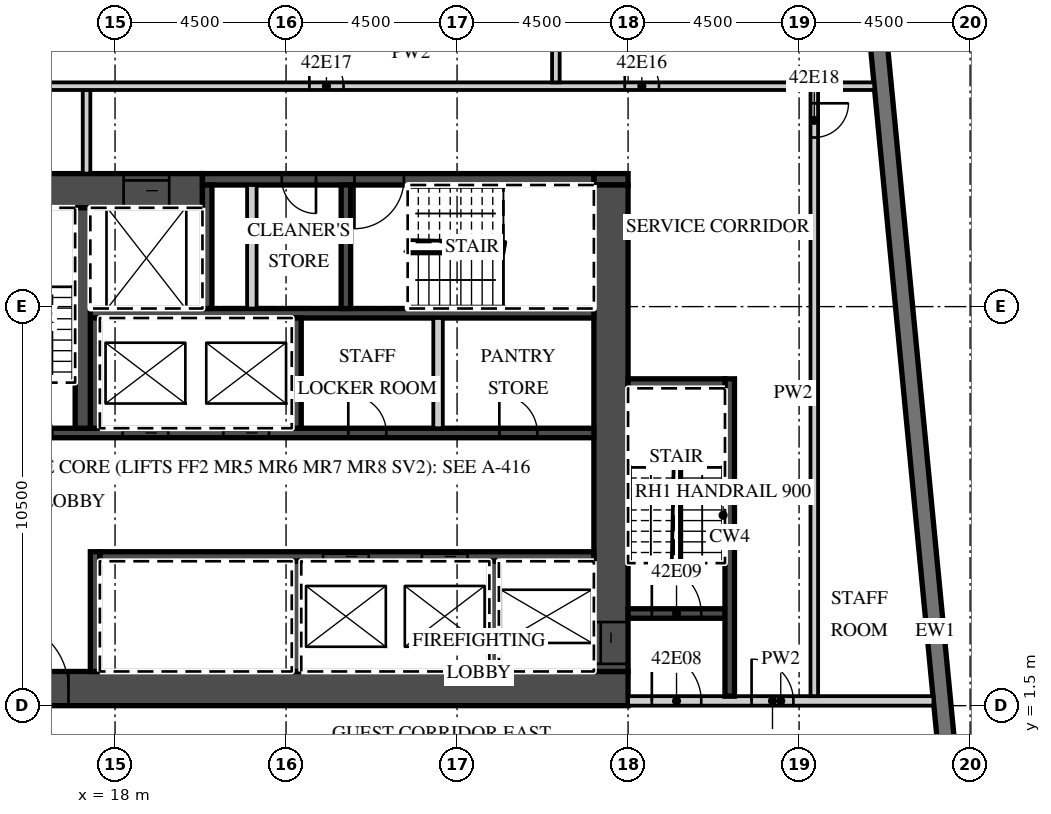
"""IFC4 building model, lengths in metres.
Left out: names, types, materials, properties, quantities, classifications, styles, units other than length and angle.
Written with IfcOpenShell. Run it as: python <this file> out.ifc"""

import sys

from ifc_helpers import new_model, si_unit, direction, frame, frame_2d, origin, place, context, subcontext, project, spatial, rectangle, extrude, element, fill, save


model = new_model("IFC4")
c1 = context("Model", 3, precision=1e-05, world=origin(), true_north=direction((0.0, 1.0)))
c2 = subcontext(c1, "Body", "Model", "MODEL_VIEW")
j1 = project(units=[si_unit("LENGTHUNIT", "METRE"), si_unit("PLANEANGLEUNIT", "RADIAN")], contexts=[c1])
p1 = place(None, origin())
s1 = spatial("IfcSite", under=j1, at=p1, CompositionType="ELEMENT")
p2 = place(p1, origin())
s2 = spatial("IfcBuilding", under=s1, at=p2, CompositionType="ELEMENT")
p3 = place(p2, frame((0.0, 0.0, 180.1)))
s3 = spatial("IfcBuildingStorey", under=s2, at=p3, CompositionType="ELEMENT", Elevation=180.1)
p4 = place(p3, frame((41.214, -13.466, 0.0), z_axis=(0.0, 0.0, 1.0), x_axis=(-0.095847314626, 0.995396047952, 0.0)))
e1 = element("IfcWall", 1, at=p4, inside=s3, PredefinedType="SOLIDWALL", context=c2, shape_type="SweptSolid", body=[
    extrude(rectangle(XDim=34.0, YDim=0.45, at=frame_2d((17.0, 0.0))), origin(), (0.0, 0.0, 1.0), 3.02),
])
p5 = place(p4, frame((3.869, 0.0, 0.45)))
e2 = element("IfcOpeningElement", 2, at=p5, cuts=e1, PredefinedType="OPENING", context=c2, shape_type="SweptSolid", body=[
    extrude(rectangle(XDim=3.3, YDim=2.25, at=frame_2d((1.65, 1.125))), frame((0.0, 0.235, 0.0), z_axis=(0.0, -1.0, 0.0), x_axis=(1.0, 0.0, 0.0)), (0.0, 0.0, 1.0), 0.47),
])
p6 = place(p4, frame((8.39, 0.0, 0.45)))
e3 = element("IfcOpeningElement", 3, at=p6, cuts=e1, PredefinedType="OPENING", context=c2, shape_type="SweptSolid", body=[
    extrude(rectangle(XDim=3.3, YDim=2.25, at=frame_2d((1.65, 1.125))), frame((0.0, 0.235, 0.0), z_axis=(0.0, -1.0, 0.0), x_axis=(1.0, 0.0, 0.0)), (0.0, 0.0, 1.0), 0.47),
])
p7 = place(p3, frame((13.5, 1.95, 0.0), z_axis=(0.0, 0.0, 1.0), x_axis=(1.0, 0.0, 0.0)))
e4 = element("IfcWall", 4, at=p7, inside=s3, PredefinedType="SHEAR", context=c2, shape_type="SweptSolid", body=[
    extrude(rectangle(XDim=18.0, YDim=0.9, at=frame_2d((9.0, 0.0))), origin(), (0.0, 0.0, 1.0), 3.02),
])
p8 = place(p7, frame((1.475, 0.0, 0.0)))
e5 = element("IfcOpeningElement", 5, at=p8, cuts=e4, PredefinedType="OPENING", context=c2, shape_type="SweptSolid", body=[
    extrude(rectangle(XDim=1.8, YDim=2.1, at=frame_2d((0.9, 1.05))), frame((0.0, 0.46, 0.0), z_axis=(0.0, -1.0, 0.0), x_axis=(1.0, 0.0, 0.0)), (0.0, 0.0, 1.0), 0.92),
])
p9 = place(p3, frame((13.5, 15.05, 0.0), z_axis=(0.0, 0.0, 1.0), x_axis=(1.0, 0.0, 0.0)))
e6 = element("IfcWall", 6, at=p9, inside=s3, PredefinedType="SHEAR", context=c2, shape_type="SweptSolid", body=[
    extrude(rectangle(XDim=6.8, YDim=0.9, at=frame_2d((3.4, 0.0))), origin(), (0.0, 0.0, 1.0), 3.02),
])
p10 = place(p9, frame((4.725, 0.0, 0.0)))
e7 = element("IfcOpeningElement", 7, at=p10, cuts=e6, PredefinedType="OPENING", context=c2, shape_type="SweptSolid", body=[
    extrude(rectangle(XDim=1.2, YDim=2.1, at=frame_2d((0.6, 1.05))), frame((0.0, 0.46, 0.0), z_axis=(0.0, -1.0, 0.0), x_axis=(1.0, 0.0, 0.0)), (0.0, 0.0, 1.0), 0.92),
])
p11 = place(p3, frame((30.6, 15.35, 0.0), z_axis=(0.0, 0.0, 1.0), x_axis=(1.0, 0.0, 0.0)))
e8 = element("IfcWall", 8, at=p11, inside=s3, PredefinedType="SHEAR", context=c2, shape_type="SweptSolid", body=[
    extrude(rectangle(XDim=0.9, YDim=0.3, at=frame_2d((0.45, 0.0))), origin(), (0.0, 0.0, 1.0), 3.02),
])
p12 = place(p3, frame((20.3, 15.35, 0.0), z_axis=(0.0, 0.0, 1.0), x_axis=(1.0, 0.0, 0.0)))
e9 = element("IfcWall", 9, at=p12, inside=s3, PredefinedType="SHEAR", context=c2, shape_type="SweptSolid", body=[
    extrude(rectangle(XDim=10.3, YDim=0.3, at=frame_2d((5.15, 0.0))), origin(), (0.0, 0.0, 1.0), 3.02),
])
p13 = place(p12, frame((4.0, 0.0, 0.0)))
e10 = element("IfcOpeningElement", 10, at=p13, cuts=e9, PredefinedType="OPENING", context=c2, shape_type="SweptSolid", body=[
    extrude(rectangle(XDim=1.3, YDim=2.1, at=frame_2d((0.65, 1.05))), frame((0.0, 0.16, 0.0), z_axis=(0.0, -1.0, 0.0), x_axis=(1.0, 0.0, 0.0)), (0.0, 0.0, 1.0), 0.32),
])
p14 = place(p12, frame((2.087, 0.0, 0.0)))
e11 = element("IfcOpeningElement", 11, at=p14, cuts=e9, PredefinedType="OPENING", context=c2, shape_type="SweptSolid", body=[
    extrude(rectangle(XDim=0.9, YDim=2.1, at=frame_2d((0.45, 1.05))), frame((0.0, 0.16, 0.0), z_axis=(0.0, -1.0, 0.0), x_axis=(1.0, 0.0, 0.0)), (0.0, 0.0, 1.0), 0.32),
])
p15 = place(p3, frame((31.05, 2.4, 0.0), z_axis=(0.0, 0.0, 1.0), x_axis=(0.0, 1.0, 0.0)))
e12 = element("IfcWall", 12, at=p15, inside=s3, PredefinedType="SHEAR", context=c2, shape_type="SweptSolid", body=[
    extrude(rectangle(XDim=12.8, YDim=0.9, at=frame_2d((6.4, 0.0))), origin(), (0.0, 0.0, 1.0), 3.02),
])
p16 = place(p15, frame((0.2, 0.0, 0.0)))
e13 = element("IfcOpeningElement", 13, at=p16, cuts=e12, PredefinedType="OPENING", context=c2, shape_type="SweptSolid", body=[
    extrude(rectangle(XDim=1.1, YDim=2.1, at=frame_2d((0.55, 1.05))), frame((0.0, 0.46, 0.0), z_axis=(0.0, -1.0, 0.0), x_axis=(1.0, 0.0, 0.0)), (0.0, 0.0, 1.0), 0.92),
])
p17 = place(p3, frame((17.6, 5.425, 0.0), z_axis=(0.0, 0.0, 1.0), x_axis=(1.0, 0.0, 0.0)))
e14 = element("IfcWall", 14, at=p17, inside=s3, PredefinedType="SHEAR", context=c2, shape_type="SweptSolid", body=[
    extrude(rectangle(XDim=13.0, YDim=0.25, at=frame_2d((6.5, 0.0))), origin(), (0.0, 0.0, 1.0), 3.02),
])
p18 = place(p17, frame((8.475, 0.0, 0.0)))
e15 = element("IfcOpeningElement", 15, at=p18, cuts=e14, PredefinedType="OPENING", context=c2, shape_type="SweptSolid", body=[
    extrude(rectangle(XDim=1.2, YDim=2.1, at=frame_2d((0.6, 1.05))), frame((0.0, 0.135, 0.0), z_axis=(0.0, -1.0, 0.0), x_axis=(1.0, 0.0, 0.0)), (0.0, 0.0, 1.0), 0.27),
])
p19 = place(p17, frame((5.875, 0.0, 0.0)))
e16 = element("IfcOpeningElement", 16, at=p19, cuts=e14, PredefinedType="OPENING", context=c2, shape_type="SweptSolid", body=[
    extrude(rectangle(XDim=1.2, YDim=2.1, at=frame_2d((0.6, 1.05))), frame((0.0, 0.135, 0.0), z_axis=(0.0, -1.0, 0.0), x_axis=(1.0, 0.0, 0.0)), (0.0, 0.0, 1.0), 0.27),
])
p20 = place(p3, frame((17.475, 2.4, 0.0), z_axis=(0.0, 0.0, 1.0), x_axis=(0.0, 1.0, 0.0)))
e17 = element("IfcWall", 17, at=p20, inside=s3, PredefinedType="SHEAR", context=c2, shape_type="SweptSolid", body=[
    extrude(rectangle(XDim=3.15, YDim=0.25, at=frame_2d((1.575, 0.0))), origin(), (0.0, 0.0, 1.0), 3.02),
])
for number, where, z_axis, x_axis in (
    (18, (27.975, 2.4, 0.0), (0.0, 0.0, 1.0), (0.0, 1.0, 0.0)),
    (19, (22.775, 2.4, 0.0), (0.0, 0.0, 1.0), (0.0, 1.0, 0.0)),
):
    element("IfcWall", number, at=place(p3, frame(where, z_axis=z_axis, x_axis=x_axis)), inside=s3, PredefinedType="SHEAR", context=c2, shape_type="SweptSolid", body=[
        extrude(rectangle(XDim=2.9, YDim=0.25, at=frame_2d((1.45, 0.0))), origin(), (0.0, 0.0, 1.0), 3.02),
    ])
p21 = place(p3, frame((14.4, 8.675, 0.0), z_axis=(0.0, 0.0, 1.0), x_axis=(1.0, 0.0, 0.0)))
e20 = element("IfcWall", 20, at=p21, inside=s3, PredefinedType="SHEAR", context=c2, shape_type="SweptSolid", body=[
    extrude(rectangle(XDim=16.2, YDim=0.25, at=frame_2d((8.1, 0.0))), origin(), (0.0, 0.0, 1.0), 3.02),
])
p22 = place(p21, frame((6.45, 0.0, 0.0)))
e21 = element("IfcOpeningElement", 21, at=p22, cuts=e20, PredefinedType="OPENING", context=c2, shape_type="SweptSolid", body=[
    extrude(rectangle(XDim=1.2, YDim=2.1, at=frame_2d((0.6, 1.05))), frame((0.0, 0.135, 0.0), z_axis=(0.0, -1.0, 0.0), x_axis=(1.0, 0.0, 0.0)), (0.0, 0.0, 1.0), 0.27),
])
p23 = place(p21, frame((3.8, 0.0, 0.0)))
e22 = element("IfcOpeningElement", 22, at=p23, cuts=e20, PredefinedType="OPENING", context=c2, shape_type="SweptSolid", body=[
    extrude(rectangle(XDim=1.2, YDim=2.1, at=frame_2d((0.6, 1.05))), frame((0.0, 0.135, 0.0), z_axis=(0.0, -1.0, 0.0), x_axis=(1.0, 0.0, 0.0)), (0.0, 0.0, 1.0), 0.27),
])
p24 = place(p21, frame((0.65, 0.0, 0.0)))
e23 = element("IfcOpeningElement", 23, at=p24, cuts=e20, PredefinedType="OPENING", context=c2, shape_type="SweptSolid", body=[
    extrude(rectangle(XDim=1.3, YDim=2.1, at=frame_2d((0.65, 1.05))), frame((0.0, 0.135, 0.0), z_axis=(0.0, -1.0, 0.0), x_axis=(1.0, 0.0, 0.0)), (0.0, 0.0, 1.0), 0.27),
])
p25 = place(p21, frame((13.712, 0.0, 0.0)))
e24 = element("IfcOpeningElement", 24, at=p25, cuts=e20, PredefinedType="OPENING", context=c2, shape_type="SweptSolid", body=[
    extrude(rectangle(XDim=1.0, YDim=2.1, at=frame_2d((0.5, 1.05))), frame((0.0, 0.135, 0.0), z_axis=(0.0, -1.0, 0.0), x_axis=(1.0, 0.0, 0.0)), (0.0, 0.0, 1.0), 0.27),
])
p26 = place(p21, frame((9.738, 0.0, 0.0)))
e25 = element("IfcOpeningElement", 25, at=p26, cuts=e20, PredefinedType="OPENING", context=c2, shape_type="SweptSolid", body=[
    extrude(rectangle(XDim=1.0, YDim=2.1, at=frame_2d((0.5, 1.05))), frame((0.0, 0.135, 0.0), z_axis=(0.0, -1.0, 0.0), x_axis=(1.0, 0.0, 0.0)), (0.0, 0.0, 1.0), 0.27),
])
p27 = place(p3, frame((17.35, 11.825, 0.0), z_axis=(0.0, 0.0, 1.0), x_axis=(1.0, 0.0, 0.0)))
e26 = element("IfcWall", 26, at=p27, inside=s3, PredefinedType="SHEAR", context=c2, shape_type="SweptSolid", body=[
    extrude(rectangle(XDim=13.25, YDim=0.25, at=frame_2d((6.625, 0.0))), origin(), (0.0, 0.0, 1.0), 3.02),
])
for number, where, z_axis, x_axis in (
    (27, (17.475, 8.8, 0.0), (0.0, 0.0, 1.0), (0.0, 1.0, 0.0)),
    (28, (22.775, 8.8, 0.0), (0.0, 0.0, 1.0), (0.0, 1.0, 0.0)),
):
    element("IfcWall", number, at=place(p3, frame(where, z_axis=z_axis, x_axis=x_axis)), inside=s3, PredefinedType="SHEAR", context=c2, shape_type="SweptSolid", body=[
        extrude(rectangle(XDim=2.9, YDim=0.25, at=frame_2d((1.45, 0.0))), origin(), (0.0, 0.0, 1.0), 3.02),
    ])
p28 = place(p3, frame((26.5, 8.8, 0.0), z_axis=(0.0, 0.0, 1.0), x_axis=(0.0, 1.0, 0.0)))
e29 = element("IfcWall", 29, at=p28, inside=s3, PredefinedType="PARTITIONING", context=c2, shape_type="SweptSolid", body=[
    extrude(rectangle(XDim=2.9, YDim=0.25, at=frame_2d((1.45, 0.0))), origin(), (0.0, 0.0, 1.0), 3.02),
])
p29 = place(p3, frame((17.15, 8.8, 0.0), z_axis=(0.0, 0.0, 1.0), x_axis=(0.0, 1.0, 0.0)))
e30 = element("IfcWall", 30, at=p29, inside=s3, PredefinedType="SHEAR", context=c2, shape_type="SweptSolid", body=[
    extrude(rectangle(XDim=5.8, YDim=0.4, at=frame_2d((2.9, 0.0))), origin(), (0.0, 0.0, 1.0), 3.02),
])
for number, where, z_axis, x_axis in (
    (31, (20.425, 11.95, 0.0), (0.0, 0.0, 1.0), (0.0, 1.0, 0.0)),
    (32, (24.075, 11.95, 0.0), (0.0, 0.0, 1.0), (0.0, 1.0, 0.0)),
):
    element("IfcWall", number, at=place(p3, frame(where, z_axis=z_axis, x_axis=x_axis)), inside=s3, PredefinedType="SHEAR", context=c2, shape_type="SweptSolid", body=[
        extrude(rectangle(XDim=3.25, YDim=0.25, at=frame_2d((1.625, 0.0))), origin(), (0.0, 0.0, 1.0), 3.02),
    ])
p30 = place(p3, frame((21.6, 11.95, 0.0), z_axis=(0.0, 0.0, 1.0), x_axis=(0.0, 1.0, 0.0)))
e33 = element("IfcWall", 33, at=p30, inside=s3, PredefinedType="PARTITIONING", context=c2, shape_type="SweptSolid", body=[
    extrude(rectangle(XDim=3.25, YDim=0.25, at=frame_2d((1.625, 0.0))), origin(), (0.0, 0.0, 1.0), 3.02),
])
p31 = place(p3, frame((31.5, 1.625, 0.0), z_axis=(0.0, 0.0, 1.0), x_axis=(1.0, 0.0, 0.0)))
e34 = element("IfcWall", 34, at=p31, inside=s3, PredefinedType="PARTITIONING", context=c2, shape_type="SweptSolid", body=[
    extrude(rectangle(XDim=8.035, YDim=0.25, at=frame_2d((4.018, 0.0))), origin(), (0.0, 0.0, 1.0), 3.02),
])
p32 = place(p31, frame((0.625, 0.0, 0.0)))
e35 = element("IfcOpeningElement", 35, at=p32, cuts=e34, PredefinedType="OPENING", context=c2, shape_type="SweptSolid", body=[
    extrude(rectangle(XDim=1.3, YDim=2.1, at=frame_2d((0.65, 1.05))), frame((0.0, 0.135, 0.0), z_axis=(0.0, -1.0, 0.0), x_axis=(1.0, 0.0, 0.0)), (0.0, 0.0, 1.0), 0.27),
])
p33 = place(p31, frame((3.25, 0.0, 0.0)))
e36 = element("IfcOpeningElement", 36, at=p33, cuts=e34, PredefinedType="OPENING", context=c2, shape_type="SweptSolid", body=[
    extrude(rectangle(XDim=1.1, YDim=2.1, at=frame_2d((0.55, 1.05))), frame((0.0, 0.135, 0.0), z_axis=(0.0, -1.0, 0.0), x_axis=(1.0, 0.0, 0.0)), (0.0, 0.0, 1.0), 0.27),
])
p34 = place(p3, frame((31.5, 3.925, 0.0), z_axis=(0.0, 0.0, 1.0), x_axis=(1.0, 0.0, 0.0)))
e37 = element("IfcWall", 37, at=p34, inside=s3, PredefinedType="SHEAR", context=c2, shape_type="SweptSolid", body=[
    extrude(rectangle(XDim=2.55, YDim=0.25, at=frame_2d((1.275, 0.0))), origin(), (0.0, 0.0, 1.0), 3.02),
])
p35 = place(p34, frame((0.625, 0.0, 0.0)))
e38 = element("IfcOpeningElement", 38, at=p35, cuts=e37, PredefinedType="OPENING", context=c2, shape_type="SweptSolid", body=[
    extrude(rectangle(XDim=1.3, YDim=2.1, at=frame_2d((0.65, 1.05))), frame((0.0, 0.135, 0.0), z_axis=(0.0, -1.0, 0.0), x_axis=(1.0, 0.0, 0.0)), (0.0, 0.0, 1.0), 0.27),
])
p36 = place(p3, frame((34.175, 1.75, 0.0), z_axis=(0.0, 0.0, 1.0), x_axis=(0.0, 1.0, 0.0)))
e39 = element("IfcWall", 39, at=p36, inside=s3, PredefinedType="SHEAR", context=c2, shape_type="SweptSolid", body=[
    extrude(rectangle(XDim=8.35, YDim=0.25, at=frame_2d((4.175, 0.0))), origin(), (0.0, 0.0, 1.0), 3.02),
])
p37 = place(p3, frame((31.5, 9.975, 0.0), z_axis=(0.0, 0.0, 1.0), x_axis=(1.0, 0.0, 0.0)))
e40 = element("IfcWall", 40, at=p37, inside=s3, PredefinedType="SHEAR", context=c2, shape_type="SweptSolid", body=[
    extrude(rectangle(XDim=2.55, YDim=0.25, at=frame_2d((1.275, 0.0))), origin(), (0.0, 0.0, 1.0), 3.02),
])
p38 = place(p3, frame((17.25, 15.5, 0.0), z_axis=(0.0, 0.0, 1.0), x_axis=(0.0, 1.0, 0.0)))
e41 = element("IfcWall", 41, at=p38, inside=s3, PredefinedType="PARTITIONING", context=c2, shape_type="SweptSolid", body=[
    extrude(rectangle(XDim=2.2, YDim=0.2, at=frame_2d((1.1, 0.0))), origin(), (0.0, 0.0, 1.0), 3.02),
])
p39 = place(p3, frame((36.4, 1.75, 0.0), z_axis=(0.0, 0.0, 1.0), x_axis=(0.0, 1.0, 0.0)))
e42 = element("IfcWall", 42, at=p39, inside=s3, PredefinedType="PARTITIONING", context=c2, shape_type="SweptSolid", body=[
    extrude(rectangle(XDim=15.95, YDim=0.2, at=frame_2d((7.975, 0.0))), origin(), (0.0, 0.0, 1.0), 3.02),
])
p40 = place(p39, frame((14.7, 0.0, 0.0)))
e43 = element("IfcOpeningElement", 43, at=p40, cuts=e42, PredefinedType="OPENING", context=c2, shape_type="SweptSolid", body=[
    extrude(rectangle(XDim=0.9, YDim=2.1, at=frame_2d((0.45, 1.05))), frame((0.0, 0.11, 0.0), z_axis=(0.0, -1.0, 0.0), x_axis=(1.0, 0.0, 0.0)), (0.0, 0.0, 1.0), 0.22),
])
p41 = place(p3, frame((13.6, 17.8, 0.0), z_axis=(0.0, 0.0, 1.0), x_axis=(1.0, 0.0, 0.0)))
e44 = element("IfcWall", 44, at=p41, inside=s3, PredefinedType="PARTITIONING", context=c2, shape_type="SweptSolid", body=[
    extrude(rectangle(XDim=24.378, YDim=0.2, at=frame_2d((12.189, 0.0))), origin(), (0.0, 0.0, 1.0), 3.02),
])
p42 = place(p41, frame((17.812, 0.0, 0.0)))
e45 = element("IfcOpeningElement", 45, at=p42, cuts=e44, PredefinedType="OPENING", context=c2, shape_type="SweptSolid", body=[
    extrude(rectangle(XDim=0.9, YDim=2.1, at=frame_2d((0.45, 1.05))), frame((0.0, 0.11, 0.0), z_axis=(0.0, -1.0, 0.0), x_axis=(1.0, 0.0, 0.0)), (0.0, 0.0, 1.0), 0.22),
])
p43 = place(p41, frame((9.512, 0.0, 0.0)))
e46 = element("IfcOpeningElement", 46, at=p43, cuts=e44, PredefinedType="OPENING", context=c2, shape_type="SweptSolid", body=[
    extrude(rectangle(XDim=0.9, YDim=2.1, at=frame_2d((0.45, 1.05))), frame((0.0, 0.11, 0.0), z_axis=(0.0, -1.0, 0.0), x_axis=(1.0, 0.0, 0.0)), (0.0, 0.0, 1.0), 0.22),
])
p44 = place(p3, frame((29.6, 17.9, 0.0), z_axis=(0.0, 0.0, 1.0), x_axis=(0.0, 1.0, 0.0)))
e47 = element("IfcWall", 47, at=p44, inside=s3, PredefinedType="PARTITIONING", context=c2, shape_type="SweptSolid", body=[
    extrude(rectangle(XDim=5.241, YDim=0.2, at=frame_2d((2.62, 0.0))), origin(), (0.0, 0.0, 1.0), 3.02),
])
p45 = place(p22, origin())
e48 = element("IfcDoor", 48, at=p45, inside=s3, OperationType="SLIDING_TO_LEFT", PredefinedType="DOOR", context=c2, shape_type="SweptSolid", body=[
    extrude(rectangle(XDim=1.2, YDim=2.1, at=frame_2d((0.6, 1.05))), frame((0.0, 0.025, 0.0), z_axis=(0.0, -1.0, 0.0), x_axis=(1.0, 0.0, 0.0)), (0.0, 0.0, 1.0), 0.05),
])
fill(e21, e48)
p46 = place(p23, origin())
e49 = element("IfcDoor", 49, at=p46, inside=s3, OperationType="SLIDING_TO_RIGHT", PredefinedType="DOOR", context=c2, shape_type="SweptSolid", body=[
    extrude(rectangle(XDim=1.2, YDim=2.1, at=frame_2d((0.6, 1.05))), frame((0.0, 0.025, 0.0), z_axis=(0.0, -1.0, 0.0), x_axis=(1.0, 0.0, 0.0)), (0.0, 0.0, 1.0), 0.05),
])
fill(e22, e49)
p47 = place(p18, origin())
e50 = element("IfcDoor", 50, at=p47, inside=s3, OperationType="SLIDING_TO_LEFT", PredefinedType="DOOR", context=c2, shape_type="SweptSolid", body=[
    extrude(rectangle(XDim=1.2, YDim=2.1, at=frame_2d((0.6, 1.05))), frame((0.0, 0.025, 0.0), z_axis=(0.0, -1.0, 0.0), x_axis=(1.0, 0.0, 0.0)), (0.0, 0.0, 1.0), 0.05),
])
fill(e15, e50)
p48 = place(p19, origin())
e51 = element("IfcDoor", 51, at=p48, inside=s3, OperationType="SLIDING_TO_RIGHT", PredefinedType="DOOR", context=c2, shape_type="SweptSolid", body=[
    extrude(rectangle(XDim=1.2, YDim=2.1, at=frame_2d((0.6, 1.05))), frame((0.0, 0.025, 0.0), z_axis=(0.0, -1.0, 0.0), x_axis=(1.0, 0.0, 0.0)), (0.0, 0.0, 1.0), 0.05),
])
fill(e16, e51)
p49 = place(p10, origin())
e52 = element("IfcDoor", 52, at=p49, inside=s3, OperationType="SLIDING_TO_LEFT", PredefinedType="DOOR", context=c2, shape_type="SweptSolid", body=[
    extrude(rectangle(XDim=1.2, YDim=2.1, at=frame_2d((0.6, 1.05))), frame((0.0, 0.025, 0.0), z_axis=(0.0, -1.0, 0.0), x_axis=(1.0, 0.0, 0.0)), (0.0, 0.0, 1.0), 0.05),
])
fill(e7, e52)
p50 = place(p16, origin())
e53 = element("IfcDoor", 53, at=p50, inside=s3, OperationType="SLIDING_TO_LEFT", PredefinedType="DOOR", context=c2, shape_type="SweptSolid", body=[
    extrude(rectangle(XDim=1.1, YDim=2.1, at=frame_2d((0.55, 1.05))), frame((0.0, 0.025, 0.0), z_axis=(0.0, -1.0, 0.0), x_axis=(1.0, 0.0, 0.0)), (0.0, 0.0, 1.0), 0.05),
])
fill(e13, e53)
p51 = place(p8, origin())
e54 = element("IfcDoor", 54, at=p51, inside=s3, OperationType="DOUBLE_DOOR_DOUBLE_SWING", PredefinedType="DOOR", context=c2, shape_type="SweptSolid", body=[
    extrude(rectangle(XDim=1.8, YDim=2.1, at=frame_2d((0.9, 1.05))), frame((0.0, 0.025, 0.0), z_axis=(0.0, -1.0, 0.0), x_axis=(1.0, 0.0, 0.0)), (0.0, 0.0, 1.0), 0.05),
])
fill(e5, e54)
p52 = place(p32, origin())
e55 = element("IfcDoor", 55, at=p52, inside=s3, OperationType="SINGLE_SWING_LEFT", PredefinedType="DOOR", context=c2, shape_type="SweptSolid", body=[
    extrude(rectangle(XDim=1.3, YDim=2.1, at=frame_2d((0.65, 1.05))), frame((0.0, 0.025, 0.0), z_axis=(0.0, -1.0, 0.0), x_axis=(1.0, 0.0, 0.0)), (0.0, 0.0, 1.0), 0.05),
])
fill(e35, e55)
p53 = place(p35, origin())
e56 = element("IfcDoor", 56, at=p53, inside=s3, OperationType="SINGLE_SWING_LEFT", PredefinedType="DOOR", context=c2, shape_type="SweptSolid", body=[
    extrude(rectangle(XDim=1.3, YDim=2.1, at=frame_2d((0.65, 1.05))), frame((0.0, 0.025, 0.0), z_axis=(0.0, -1.0, 0.0), x_axis=(1.0, 0.0, 0.0)), (0.0, 0.0, 1.0), 0.05),
])
fill(e38, e56)
p54 = place(p33, origin())
e57 = element("IfcDoor", 57, at=p54, inside=s3, OperationType="SINGLE_SWING_LEFT", PredefinedType="DOOR", context=c2, shape_type="SweptSolid", body=[
    extrude(rectangle(XDim=1.1, YDim=2.1, at=frame_2d((0.55, 1.05))), frame((0.0, 0.025, 0.0), z_axis=(0.0, -1.0, 0.0), x_axis=(1.0, 0.0, 0.0)), (0.0, 0.0, 1.0), 0.05),
])
fill(e36, e57)
p55 = place(p13, origin())
e58 = element("IfcDoor", 58, at=p55, inside=s3, OperationType="SINGLE_SWING_LEFT", PredefinedType="DOOR", context=c2, shape_type="SweptSolid", body=[
    extrude(rectangle(XDim=1.3, YDim=2.1, at=frame_2d((0.65, 1.05))), frame((0.0, 0.025, 0.0), z_axis=(0.0, -1.0, 0.0), x_axis=(1.0, 0.0, 0.0)), (0.0, 0.0, 1.0), 0.05),
])
fill(e10, e58)
p56 = place(p14, origin())
e59 = element("IfcDoor", 59, at=p56, inside=s3, OperationType="SINGLE_SWING_RIGHT", PredefinedType="DOOR", context=c2, shape_type="SweptSolid", body=[
    extrude(rectangle(XDim=0.9, YDim=2.1, at=frame_2d((0.45, 1.05))), frame((0.0, 0.025, 0.0), z_axis=(0.0, -1.0, 0.0), x_axis=(1.0, 0.0, 0.0)), (0.0, 0.0, 1.0), 0.05),
])
fill(e11, e59)
p57 = place(p25, origin())
e60 = element("IfcDoor", 60, at=p57, inside=s3, OperationType="SINGLE_SWING_LEFT", PredefinedType="DOOR", context=c2, shape_type="SweptSolid", body=[
    extrude(rectangle(XDim=1.0, YDim=2.1, at=frame_2d((0.5, 1.05))), frame((0.0, 0.025, 0.0), z_axis=(0.0, -1.0, 0.0), x_axis=(1.0, 0.0, 0.0)), (0.0, 0.0, 1.0), 0.05),
])
fill(e24, e60)
p58 = place(p26, origin())
e61 = element("IfcDoor", 61, at=p58, inside=s3, OperationType="SINGLE_SWING_LEFT", PredefinedType="DOOR", context=c2, shape_type="SweptSolid", body=[
    extrude(rectangle(XDim=1.0, YDim=2.1, at=frame_2d((0.5, 1.05))), frame((0.0, 0.025, 0.0), z_axis=(0.0, -1.0, 0.0), x_axis=(1.0, 0.0, 0.0)), (0.0, 0.0, 1.0), 0.05),
])
fill(e25, e61)
p59 = place(p42, origin())
e62 = element("IfcDoor", 62, at=p59, inside=s3, OperationType="SINGLE_SWING_LEFT", PredefinedType="DOOR", context=c2, shape_type="SweptSolid", body=[
    extrude(rectangle(XDim=0.9, YDim=2.1, at=frame_2d((0.45, 1.05))), frame((0.0, 0.025, 0.0), z_axis=(0.0, -1.0, 0.0), x_axis=(1.0, 0.0, 0.0)), (0.0, 0.0, 1.0), 0.05),
])
fill(e45, e62)
p60 = place(p43, origin())
e63 = element("IfcDoor", 63, at=p60, inside=s3, OperationType="SINGLE_SWING_LEFT", PredefinedType="DOOR", context=c2, shape_type="SweptSolid", body=[
    extrude(rectangle(XDim=0.9, YDim=2.1, at=frame_2d((0.45, 1.05))), frame((0.0, 0.025, 0.0), z_axis=(0.0, -1.0, 0.0), x_axis=(1.0, 0.0, 0.0)), (0.0, 0.0, 1.0), 0.05),
])
fill(e46, e63)
p61 = place(p40, origin())
e64 = element("IfcDoor", 64, at=p61, inside=s3, OperationType="SINGLE_SWING_RIGHT", PredefinedType="DOOR", context=c2, shape_type="SweptSolid", body=[
    extrude(rectangle(XDim=0.9, YDim=2.1, at=frame_2d((0.45, 1.05))), frame((0.0, 0.025, 0.0), z_axis=(0.0, -1.0, 0.0), x_axis=(1.0, 0.0, 0.0)), (0.0, 0.0, 1.0), 0.05),
])
fill(e43, e64)
save(model, sys.argv[1])
